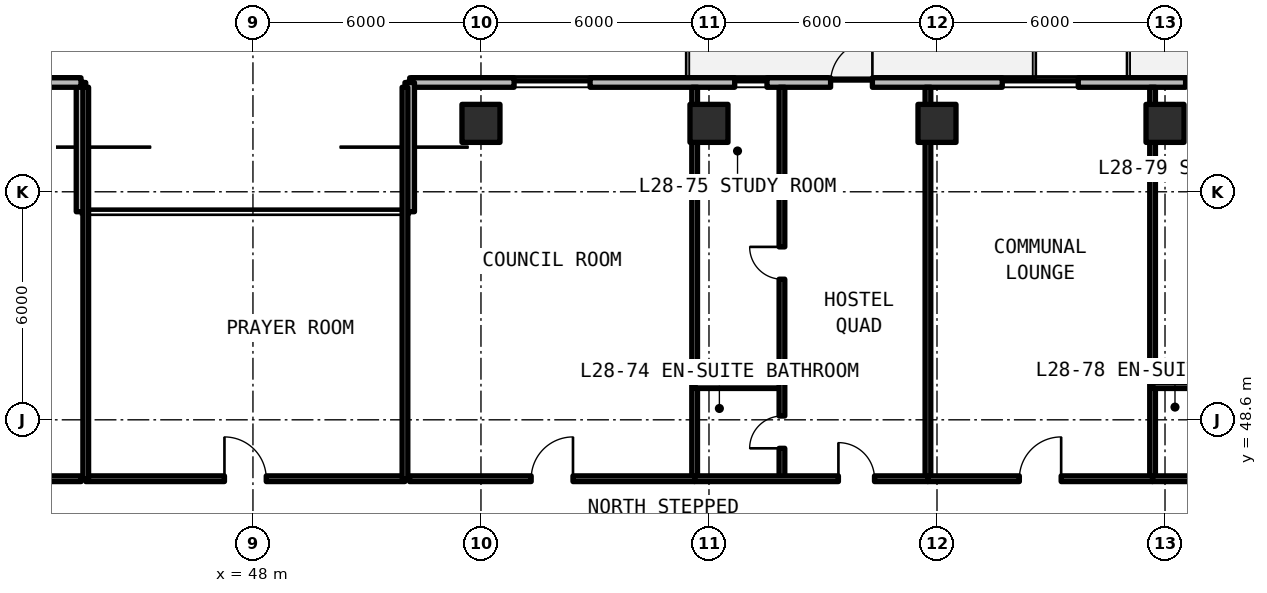
"""IFC4 building model, lengths in metres.
Left out: names, types, materials, properties, quantities, classifications, styles, units other than length and angle.
Written with IfcOpenShell. Run it as: python <this file> out.ifc"""

import sys

from ifc_helpers import new_model, si_unit, direction, frame, frame_2d, origin, origin_2d, place, context, subcontext, project, spatial, rectangle, extrude, element, fill, save


model = new_model("IFC4")
c1 = context("Model", 3, precision=1e-05, world=origin(), true_north=direction((0.0, 1.0)))
c2 = subcontext(c1, "Body", "Model", "MODEL_VIEW")
j1 = project(units=[si_unit("LENGTHUNIT", "METRE"), si_unit("PLANEANGLEUNIT", "RADIAN")], contexts=[c1])
p1 = place(None, origin())
s1 = spatial("IfcSite", under=j1, at=p1, CompositionType="ELEMENT")
p2 = place(p1, origin())
s2 = spatial("IfcBuilding", under=s1, at=p2, CompositionType="ELEMENT")
p3 = place(p2, frame((0.0, 0.0, 101.97)))
s3 = spatial("IfcBuildingStorey", under=s2, at=p3, CompositionType="ELEMENT", Elevation=101.97)
for number, where, z_axis, x_axis in (
    (1, (54.0, 56.4, 0.0), (0.0, 0.0, 1.0), (1.0, 0.0, 0.0)),
    (2, (60.0, 56.4, 0.0), (0.0, 0.0, 1.0), (1.0, 0.0, 0.0)),
    (3, (66.0, 56.4, 0.0), (0.0, 0.0, 1.0), (1.0, 0.0, 0.0)),
    (4, (72.0, 56.4, 0.0), (0.0, 0.0, 1.0), (1.0, 0.0, 0.0)),
):
    element("IfcColumn", number, at=place(p3, frame(where, z_axis=z_axis, x_axis=x_axis)), inside=s3, PredefinedType="COLUMN", context=c2, shape_type="SweptSolid", body=[
        extrude(rectangle(XDim=1.0, YDim=1.0, at=origin_2d()), origin(), (0.0, 0.0, 1.0), 3.3),
    ])
p4 = place(p3, frame((96.148, 57.475, 0.0), z_axis=(0.0, 0.0, 1.0), x_axis=(-1.0, 0.0, 0.0)))
e5 = element("IfcWall", 5, at=p4, inside=s3, PredefinedType="SOLIDWALL", context=c2, shape_type="SweptSolid", body=[
    extrude(rectangle(XDim=44.023, YDim=0.25, at=frame_2d((22.012, 0.0))), origin(), (0.0, 0.0, 1.0), 3.08),
])
p5 = place(p4, frame((31.848, 0.0, 0.0)))
e6 = element("IfcOpeningElement", 6, at=p5, cuts=e5, PredefinedType="OPENING", context=c2, shape_type="SweptSolid", body=[
    extrude(rectangle(XDim=1.1, YDim=2.15, at=frame_2d((0.55, 1.075))), frame((0.0, 0.135, 0.0), z_axis=(0.0, -1.0, 0.0), x_axis=(1.0, 0.0, 0.0)), (0.0, 0.0, 1.0), 0.27),
])
p6 = place(p4, frame((19.998, 0.0, 0.0)))
e7 = element("IfcOpeningElement", 7, at=p6, cuts=e5, PredefinedType="OPENING", context=c2, shape_type="SweptSolid", body=[
    extrude(rectangle(XDim=1.1, YDim=2.15, at=frame_2d((0.55, 1.075))), frame((0.0, 0.135, 0.0), z_axis=(0.0, -1.0, 0.0), x_axis=(1.0, 0.0, 0.0)), (0.0, 0.0, 1.0), 0.27),
])
p7 = place(p4, frame((8.398, 0.0, 0.0)))
e8 = element("IfcOpeningElement", 8, at=p7, cuts=e5, PredefinedType="OPENING", context=c2, shape_type="SweptSolid", body=[
    extrude(rectangle(XDim=1.1, YDim=2.15, at=frame_2d((0.55, 1.075))), frame((0.0, 0.135, 0.0), z_axis=(0.0, -1.0, 0.0), x_axis=(1.0, 0.0, 0.0)), (0.0, 0.0, 1.0), 0.27),
])
p8 = place(p4, frame((39.277, 0.0, 0.78)))
e9 = element("IfcOpeningElement", 9, at=p8, cuts=e5, PredefinedType="OPENING", context=c2, shape_type="SweptSolid", body=[
    extrude(rectangle(XDim=2.0, YDim=1.66, at=frame_2d((1.0, 0.83))), frame((0.0, 0.135, 0.0), z_axis=(0.0, -1.0, 0.0), x_axis=(1.0, 0.0, 0.0)), (0.0, 0.0, 1.0), 0.27),
])
p9 = place(p4, frame((34.622, 0.0, 0.78)))
e10 = element("IfcOpeningElement", 10, at=p9, cuts=e5, PredefinedType="OPENING", context=c2, shape_type="SweptSolid", body=[
    extrude(rectangle(XDim=0.85, YDim=1.65, at=frame_2d((0.425, 0.825))), frame((0.0, 0.135, 0.0), z_axis=(0.0, -1.0, 0.0), x_axis=(1.0, 0.0, 0.0)), (0.0, 0.0, 1.0), 0.27),
])
p10 = place(p4, frame((26.431, 0.0, 0.78)))
e11 = element("IfcOpeningElement", 11, at=p10, cuts=e5, PredefinedType="OPENING", context=c2, shape_type="SweptSolid", body=[
    extrude(rectangle(XDim=2.0, YDim=1.66, at=frame_2d((1.0, 0.83))), frame((0.0, 0.135, 0.0), z_axis=(0.0, -1.0, 0.0), x_axis=(1.0, 0.0, 0.0)), (0.0, 0.0, 1.0), 0.27),
])
p11 = place(p4, frame((22.757, 0.0, 0.78)))
e12 = element("IfcOpeningElement", 12, at=p11, cuts=e5, PredefinedType="OPENING", context=c2, shape_type="SweptSolid", body=[
    extrude(rectangle(XDim=0.85, YDim=1.65, at=frame_2d((0.425, 0.825))), frame((0.0, 0.135, 0.0), z_axis=(0.0, -1.0, 0.0), x_axis=(1.0, 0.0, 0.0)), (0.0, 0.0, 1.0), 0.27),
])
p12 = place(p4, frame((16.669, 0.0, 0.78)))
e13 = element("IfcOpeningElement", 13, at=p12, cuts=e5, PredefinedType="OPENING", context=c2, shape_type="SweptSolid", body=[
    extrude(rectangle(XDim=0.85, YDim=1.65, at=frame_2d((0.425, 0.825))), frame((0.0, 0.135, 0.0), z_axis=(0.0, -1.0, 0.0), x_axis=(1.0, 0.0, 0.0)), (0.0, 0.0, 1.0), 0.27),
])
p13 = place(p4, frame((13.159, 0.0, 0.78)))
e14 = element("IfcOpeningElement", 14, at=p13, cuts=e5, PredefinedType="OPENING", context=c2, shape_type="SweptSolid", body=[
    extrude(rectangle(XDim=2.0, YDim=1.66, at=frame_2d((1.0, 0.83))), frame((0.0, 0.135, 0.0), z_axis=(0.0, -1.0, 0.0), x_axis=(1.0, 0.0, 0.0)), (0.0, 0.0, 1.0), 0.27),
])
p14 = place(p4, frame((10.56, 0.0, 0.78)))
e15 = element("IfcOpeningElement", 15, at=p14, cuts=e5, PredefinedType="OPENING", context=c2, shape_type="SweptSolid", body=[
    extrude(rectangle(XDim=0.85, YDim=1.65, at=frame_2d((0.425, 0.825))), frame((0.0, 0.135, 0.0), z_axis=(0.0, -1.0, 0.0), x_axis=(1.0, 0.0, 0.0)), (0.0, 0.0, 1.0), 0.27),
])
p15 = place(p4, frame((4.619, 0.0, 0.78)))
e16 = element("IfcOpeningElement", 16, at=p15, cuts=e5, PredefinedType="OPENING", context=c2, shape_type="SweptSolid", body=[
    extrude(rectangle(XDim=0.85, YDim=1.65, at=frame_2d((0.425, 0.825))), frame((0.0, 0.135, 0.0), z_axis=(0.0, -1.0, 0.0), x_axis=(1.0, 0.0, 0.0)), (0.0, 0.0, 1.0), 0.27),
])
p16 = place(p4, frame((1.109, 0.0, 0.78)))
e17 = element("IfcOpeningElement", 17, at=p16, cuts=e5, PredefinedType="OPENING", context=c2, shape_type="SweptSolid", body=[
    extrude(rectangle(XDim=2.0, YDim=1.66, at=frame_2d((1.0, 0.83))), frame((0.0, 0.135, 0.0), z_axis=(0.0, -1.0, 0.0), x_axis=(1.0, 0.0, 0.0)), (0.0, 0.0, 1.0), 0.27),
])
for number, where, z_axis, x_axis in (
    (18, (52.125, 57.475, 0.0), (0.0, 0.0, 1.0), (0.0, -1.0, 0.0)),
    (19, (43.475, 54.075, 0.0), (0.0, 0.0, 1.0), (0.0, 1.0, 0.0)),
):
    element("IfcWall", number, at=place(p3, frame(where, z_axis=z_axis, x_axis=x_axis)), inside=s3, PredefinedType="SOLIDWALL", context=c2, shape_type="SweptSolid", body=[
        extrude(rectangle(XDim=3.4, YDim=0.25, at=frame_2d((1.7, 0.0))), origin(), (0.0, 0.0, 1.0), 3.08),
    ])
p17 = place(p3, frame((43.475, 57.475, 0.0), z_axis=(0.0, 0.0, 1.0), x_axis=(-1.0, 0.0, 0.0)))
e20 = element("IfcWall", 20, at=p17, inside=s3, PredefinedType="SOLIDWALL", context=c2, shape_type="SweptSolid", body=[
    extrude(rectangle(XDim=22.023, YDim=0.25, at=frame_2d((11.012, 0.0))), origin(), (0.0, 0.0, 1.0), 3.08),
])
p18 = place(p17, frame((14.925, 0.0, 0.0)))
e21 = element("IfcOpeningElement", 21, at=p18, cuts=e20, PredefinedType="OPENING", context=c2, shape_type="SweptSolid", body=[
    extrude(rectangle(XDim=1.1, YDim=2.15, at=frame_2d((0.55, 1.075))), frame((0.0, 0.135, 0.0), z_axis=(0.0, -1.0, 0.0), x_axis=(1.0, 0.0, 0.0)), (0.0, 0.0, 1.0), 0.27),
])
p19 = place(p17, frame((17.31, 0.0, 0.78)))
e22 = element("IfcOpeningElement", 22, at=p19, cuts=e20, PredefinedType="OPENING", context=c2, shape_type="SweptSolid", body=[
    extrude(rectangle(XDim=1.4, YDim=1.65, at=frame_2d((0.7, 0.825))), frame((0.0, 0.135, 0.0), z_axis=(0.0, -1.0, 0.0), x_axis=(1.0, 0.0, 0.0)), (0.0, 0.0, 1.0), 0.27),
])
p20 = place(p17, frame((10.125, 0.0, 0.78)))
e23 = element("IfcOpeningElement", 23, at=p20, cuts=e20, PredefinedType="OPENING", context=c2, shape_type="SweptSolid", body=[
    extrude(rectangle(XDim=0.85, YDim=1.65, at=frame_2d((0.425, 0.825))), frame((0.0, 0.135, 0.0), z_axis=(0.0, -1.0, 0.0), x_axis=(1.0, 0.0, 0.0)), (0.0, 0.0, 1.0), 0.27),
])
p21 = place(p17, frame((5.714, 0.0, 0.78)))
e24 = element("IfcOpeningElement", 24, at=p21, cuts=e20, PredefinedType="OPENING", context=c2, shape_type="SweptSolid", body=[
    extrude(rectangle(XDim=0.85, YDim=1.65, at=frame_2d((0.425, 0.825))), frame((0.0, 0.135, 0.0), z_axis=(0.0, -1.0, 0.0), x_axis=(1.0, 0.0, 0.0)), (0.0, 0.0, 1.0), 0.27),
])
p22 = place(p17, frame((2.08, 0.0, 0.78)))
e25 = element("IfcOpeningElement", 25, at=p22, cuts=e20, PredefinedType="OPENING", context=c2, shape_type="SweptSolid", body=[
    extrude(rectangle(XDim=0.85, YDim=1.65, at=frame_2d((0.425, 0.825))), frame((0.0, 0.135, 0.0), z_axis=(0.0, -1.0, 0.0), x_axis=(1.0, 0.0, 0.0)), (0.0, 0.0, 1.0), 0.27),
])
p23 = place(p3, frame((43.6, 47.05, 0.0), z_axis=(0.0, 0.0, 1.0), x_axis=(1.0, 0.0, 0.0)))
e26 = element("IfcWall", 26, at=p23, inside=s3, PredefinedType="SOLIDWALL", context=c2, shape_type="SweptSolid", body=[
    extrude(rectangle(XDim=8.4, YDim=0.15, at=frame_2d((4.2, 0.0))), origin(), (0.0, 0.0, 1.0), 2.35),
])
p24 = place(p23, frame((3.65, 0.0, 0.0)))
e27 = element("IfcOpeningElement", 27, at=p24, cuts=e26, PredefinedType="OPENING", context=c2, shape_type="SweptSolid", body=[
    extrude(rectangle(XDim=1.1, YDim=2.15, at=frame_2d((0.55, 1.075))), frame((0.0, 0.085, 0.0), z_axis=(0.0, -1.0, 0.0), x_axis=(1.0, 0.0, 0.0)), (0.0, 0.0, 1.0), 0.17),
])
for number, where, z_axis, x_axis in (
    (28, (43.6, 47.05, 0.0), (0.0, 0.0, 1.0), (0.0, 1.0, 0.0)),
    (29, (52.0, 47.05, 0.0), (0.0, 0.0, 1.0), (0.0, 1.0, 0.0)),
):
    element("IfcWall", number, at=place(p3, frame(where, z_axis=z_axis, x_axis=x_axis)), inside=s3, PredefinedType="SOLIDWALL", context=c2, shape_type="SweptSolid", body=[
        extrude(rectangle(XDim=10.3, YDim=0.15, at=frame_2d((5.15, 0.0))), origin(), (0.0, 0.0, 1.0), 2.35),
    ])
p25 = place(p3, frame((38.692, 47.05, 0.0), z_axis=(0.0, 0.0, 1.0), x_axis=(1.0, 0.0, 0.0)))
e30 = element("IfcWall", 30, at=p25, inside=s3, PredefinedType="SOLIDWALL", context=c2, shape_type="SweptSolid", body=[
    extrude(rectangle(XDim=4.788, YDim=0.15, at=frame_2d((2.394, 0.0))), origin(), (0.0, 0.0, 1.0), 2.35),
])
p26 = place(p25, frame((2.653, 0.0, 0.0)))
e31 = element("IfcOpeningElement", 31, at=p26, cuts=e30, PredefinedType="OPENING", context=c2, shape_type="SweptSolid", body=[
    extrude(rectangle(XDim=0.95, YDim=2.15, at=frame_2d((0.475, 1.075))), frame((0.0, 0.085, 0.0), z_axis=(0.0, -1.0, 0.0), x_axis=(1.0, 0.0, 0.0)), (0.0, 0.0, 1.0), 0.17),
])
p27 = place(p3, frame((59.623, 47.05, 0.0), z_axis=(0.0, 0.0, 1.0), x_axis=(0.0, 1.0, 0.0)))
e32 = element("IfcWall", 32, at=p27, inside=s3, PredefinedType="SOLIDWALL", context=c2, shape_type="SweptSolid", body=[
    extrude(rectangle(XDim=10.3, YDim=0.15, at=frame_2d((5.15, 0.0))), origin(), (0.0, 0.0, 1.0), 2.35),
])
p28 = place(p3, frame((52.12, 47.05, 0.0), z_axis=(0.0, 0.0, 1.0), x_axis=(1.0, 0.0, 0.0)))
e33 = element("IfcWall", 33, at=p28, inside=s3, PredefinedType="SOLIDWALL", context=c2, shape_type="SweptSolid", body=[
    extrude(rectangle(XDim=7.503, YDim=0.15, at=frame_2d((3.751, 0.0))), origin(), (0.0, 0.0, 1.0), 2.35),
])
p29 = place(p28, frame((3.201, 0.0, 0.0)))
e34 = element("IfcOpeningElement", 34, at=p29, cuts=e33, PredefinedType="OPENING", context=c2, shape_type="SweptSolid", body=[
    extrude(rectangle(XDim=1.1, YDim=2.15, at=frame_2d((0.55, 1.075))), frame((0.0, 0.085, 0.0), z_axis=(0.0, -1.0, 0.0), x_axis=(1.0, 0.0, 0.0)), (0.0, 0.0, 1.0), 0.17),
])
p30 = place(p3, frame((65.761, 47.05, 0.0), z_axis=(0.0, 0.0, 1.0), x_axis=(0.0, 1.0, 0.0)))
e35 = element("IfcWall", 35, at=p30, inside=s3, PredefinedType="SOLIDWALL", context=c2, shape_type="SweptSolid", body=[
    extrude(rectangle(XDim=10.3, YDim=0.15, at=frame_2d((5.15, 0.0))), origin(), (0.0, 0.0, 1.0), 2.35),
])
p31 = place(p3, frame((59.623, 49.5, 0.0), z_axis=(0.0, 0.0, 1.0), x_axis=(1.0, 0.0, 0.0)))
e36 = element("IfcWall", 36, at=p31, inside=s3, PredefinedType="PARTITIONING", context=c2, shape_type="SweptSolid", body=[
    extrude(rectangle(XDim=2.297, YDim=0.15, at=frame_2d((1.148, 0.0))), origin(), (0.0, 0.0, 1.0), 2.35),
])
p32 = place(p3, frame((61.92, 47.05, 0.0), z_axis=(0.0, 0.0, 1.0), x_axis=(0.0, 1.0, 0.0)))
e37 = element("IfcWall", 37, at=p32, inside=s3, PredefinedType="PARTITIONING", context=c2, shape_type="SweptSolid", body=[
    extrude(rectangle(XDim=10.3, YDim=0.15, at=frame_2d((5.15, 0.0))), origin(), (0.0, 0.0, 1.0), 2.35),
])
p33 = place(p32, frame((0.8, 0.0, 0.0)))
e38 = element("IfcOpeningElement", 38, at=p33, cuts=e37, PredefinedType="OPENING", context=c2, shape_type="SweptSolid", body=[
    extrude(rectangle(XDim=0.85, YDim=2.1, at=frame_2d((0.425, 1.05))), frame((0.0, 0.085, 0.0), z_axis=(0.0, -1.0, 0.0), x_axis=(1.0, 0.0, 0.0)), (0.0, 0.0, 1.0), 0.17),
])
p34 = place(p32, frame((5.25, 0.0, 0.0)))
e39 = element("IfcOpeningElement", 39, at=p34, cuts=e37, PredefinedType="OPENING", context=c2, shape_type="SweptSolid", body=[
    extrude(rectangle(XDim=0.85, YDim=2.1, at=frame_2d((0.425, 1.05))), frame((0.0, 0.085, 0.0), z_axis=(0.0, -1.0, 0.0), x_axis=(1.0, 0.0, 0.0)), (0.0, 0.0, 1.0), 0.17),
])
p35 = place(p3, frame((59.623, 47.05, 0.0), z_axis=(0.0, 0.0, 1.0), x_axis=(1.0, 0.0, 0.0)))
e40 = element("IfcWall", 40, at=p35, inside=s3, PredefinedType="SOLIDWALL", context=c2, shape_type="SweptSolid", body=[
    extrude(rectangle(XDim=6.139, YDim=0.15, at=frame_2d((3.069, 0.0))), origin(), (0.0, 0.0, 1.0), 2.35),
])
p36 = place(p35, frame((3.783, 0.0, 0.0)))
e41 = element("IfcOpeningElement", 41, at=p36, cuts=e40, PredefinedType="OPENING", context=c2, shape_type="SweptSolid", body=[
    extrude(rectangle(XDim=0.95, YDim=2.15, at=frame_2d((0.475, 1.075))), frame((0.0, 0.085, 0.0), z_axis=(0.0, -1.0, 0.0), x_axis=(1.0, 0.0, 0.0)), (0.0, 0.0, 1.0), 0.17),
])
p37 = place(p3, frame((71.673, 47.05, 0.0), z_axis=(0.0, 0.0, 1.0), x_axis=(0.0, 1.0, 0.0)))
e42 = element("IfcWall", 42, at=p37, inside=s3, PredefinedType="SOLIDWALL", context=c2, shape_type="SweptSolid", body=[
    extrude(rectangle(XDim=10.3, YDim=0.15, at=frame_2d((5.15, 0.0))), origin(), (0.0, 0.0, 1.0), 2.35),
])
p38 = place(p3, frame((65.761, 47.05, 0.0), z_axis=(0.0, 0.0, 1.0), x_axis=(1.0, 0.0, 0.0)))
e43 = element("IfcWall", 43, at=p38, inside=s3, PredefinedType="SOLIDWALL", context=c2, shape_type="SweptSolid", body=[
    extrude(rectangle(XDim=5.911, YDim=0.15, at=frame_2d((2.956, 0.0))), origin(), (0.0, 0.0, 1.0), 2.35),
])
p39 = place(p38, frame((2.406, 0.0, 0.0)))
e44 = element("IfcOpeningElement", 44, at=p39, cuts=e43, PredefinedType="OPENING", context=c2, shape_type="SweptSolid", body=[
    extrude(rectangle(XDim=1.1, YDim=2.15, at=frame_2d((0.55, 1.075))), frame((0.0, 0.085, 0.0), z_axis=(0.0, -1.0, 0.0), x_axis=(1.0, 0.0, 0.0)), (0.0, 0.0, 1.0), 0.17),
])
p40 = place(p3, frame((71.673, 49.5, 0.0), z_axis=(0.0, 0.0, 1.0), x_axis=(1.0, 0.0, 0.0)))
e45 = element("IfcWall", 45, at=p40, inside=s3, PredefinedType="PARTITIONING", context=c2, shape_type="SweptSolid", body=[
    extrude(rectangle(XDim=2.247, YDim=0.15, at=frame_2d((1.124, 0.0))), origin(), (0.0, 0.0, 1.0), 2.35),
])
p41 = place(p3, frame((71.673, 47.05, 0.0), z_axis=(0.0, 0.0, 1.0), x_axis=(1.0, 0.0, 0.0)))
e46 = element("IfcWall", 46, at=p41, inside=s3, PredefinedType="SOLIDWALL", context=c2, shape_type="SweptSolid", body=[
    extrude(rectangle(XDim=6.366, YDim=0.15, at=frame_2d((3.183, 0.0))), origin(), (0.0, 0.0, 1.0), 2.35),
])
p42 = place(p41, frame((3.872, 0.0, 0.0)))
e47 = element("IfcOpeningElement", 47, at=p42, cuts=e46, PredefinedType="OPENING", context=c2, shape_type="SweptSolid", body=[
    extrude(rectangle(XDim=0.95, YDim=2.15, at=frame_2d((0.475, 1.075))), frame((0.0, 0.085, 0.0), z_axis=(0.0, -1.0, 0.0), x_axis=(1.0, 0.0, 0.0)), (0.0, 0.0, 1.0), 0.17),
])
p43 = place(p5, frame((1.1, 0.0, 0.0), z_axis=(0.0, 0.0, 1.0), x_axis=(-1.0, 0.0, 0.0)))
e48 = element("IfcDoor", 48, at=p43, inside=s3, OperationType="SINGLE_SWING_RIGHT", PredefinedType="DOOR", context=c2, shape_type="SweptSolid", body=[
    extrude(rectangle(XDim=1.1, YDim=2.15, at=frame_2d((0.55, 1.075))), frame((0.0, 0.025, 0.0), z_axis=(0.0, -1.0, 0.0), x_axis=(1.0, 0.0, 0.0)), (0.0, 0.0, 1.0), 0.05),
])
fill(e6, e48)
p44 = place(p8, origin())
e49 = element("IfcWindow", 49, at=p44, inside=s3, PartitioningType="SINGLE_PANEL", PredefinedType="WINDOW", context=c2, shape_type="SweptSolid", body=[
    extrude(rectangle(XDim=2.0, YDim=1.66, at=frame_2d((1.0, 0.83))), frame((0.0, 0.03, 0.0), z_axis=(0.0, -1.0, 0.0), x_axis=(1.0, 0.0, 0.0)), (0.0, 0.0, 1.0), 0.06),
])
fill(e9, e49)
p45 = place(p9, origin())
e50 = element("IfcWindow", 50, at=p45, inside=s3, PartitioningType="SINGLE_PANEL", PredefinedType="WINDOW", context=c2, shape_type="SweptSolid", body=[
    extrude(rectangle(XDim=0.85, YDim=1.65, at=frame_2d((0.425, 0.825))), frame((0.0, 0.03, 0.0), z_axis=(0.0, -1.0, 0.0), x_axis=(1.0, 0.0, 0.0)), (0.0, 0.0, 1.0), 0.06),
])
fill(e10, e50)
p46 = place(p10, origin())
e51 = element("IfcWindow", 51, at=p46, inside=s3, PartitioningType="SINGLE_PANEL", PredefinedType="WINDOW", context=c2, shape_type="SweptSolid", body=[
    extrude(rectangle(XDim=2.0, YDim=1.66, at=frame_2d((1.0, 0.83))), frame((0.0, 0.03, 0.0), z_axis=(0.0, -1.0, 0.0), x_axis=(1.0, 0.0, 0.0)), (0.0, 0.0, 1.0), 0.06),
])
fill(e11, e51)
p47 = place(p11, origin())
e52 = element("IfcWindow", 52, at=p47, inside=s3, PartitioningType="SINGLE_PANEL", PredefinedType="WINDOW", context=c2, shape_type="SweptSolid", body=[
    extrude(rectangle(XDim=0.85, YDim=1.65, at=frame_2d((0.425, 0.825))), frame((0.0, 0.03, 0.0), z_axis=(0.0, -1.0, 0.0), x_axis=(1.0, 0.0, 0.0)), (0.0, 0.0, 1.0), 0.06),
])
fill(e12, e52)
p48 = place(p24, origin())
e53 = element("IfcDoor", 53, at=p48, inside=s3, OperationType="SINGLE_SWING_LEFT", PredefinedType="DOOR", context=c2, shape_type="SweptSolid", body=[
    extrude(rectangle(XDim=1.1, YDim=2.15, at=frame_2d((0.55, 1.075))), frame((0.0, 0.025, 0.0), z_axis=(0.0, -1.0, 0.0), x_axis=(1.0, 0.0, 0.0)), (0.0, 0.0, 1.0), 0.05),
])
fill(e27, e53)
p49 = place(p29, origin())
e54 = element("IfcDoor", 54, at=p49, inside=s3, OperationType="SINGLE_SWING_RIGHT", PredefinedType="DOOR", context=c2, shape_type="SweptSolid", body=[
    extrude(rectangle(XDim=1.1, YDim=2.15, at=frame_2d((0.55, 1.075))), frame((0.0, 0.025, 0.0), z_axis=(0.0, -1.0, 0.0), x_axis=(1.0, 0.0, 0.0)), (0.0, 0.0, 1.0), 0.05),
])
fill(e34, e54)
p50 = place(p33, origin())
e55 = element("IfcDoor", 55, at=p50, inside=s3, OperationType="SINGLE_SWING_LEFT", PredefinedType="DOOR", context=c2, shape_type="SweptSolid", body=[
    extrude(rectangle(XDim=0.85, YDim=2.1, at=frame_2d((0.425, 1.05))), frame((0.0, 0.025, 0.0), z_axis=(0.0, -1.0, 0.0), x_axis=(1.0, 0.0, 0.0)), (0.0, 0.0, 1.0), 0.05),
])
fill(e38, e55)
p51 = place(p34, origin())
e56 = element("IfcDoor", 56, at=p51, inside=s3, OperationType="SINGLE_SWING_RIGHT", PredefinedType="DOOR", context=c2, shape_type="SweptSolid", body=[
    extrude(rectangle(XDim=0.85, YDim=2.1, at=frame_2d((0.425, 1.05))), frame((0.0, 0.025, 0.0), z_axis=(0.0, -1.0, 0.0), x_axis=(1.0, 0.0, 0.0)), (0.0, 0.0, 1.0), 0.05),
])
fill(e39, e56)
p52 = place(p36, origin())
e57 = element("IfcDoor", 57, at=p52, inside=s3, OperationType="SINGLE_SWING_LEFT", PredefinedType="DOOR", context=c2, shape_type="SweptSolid", body=[
    extrude(rectangle(XDim=0.95, YDim=2.15, at=frame_2d((0.475, 1.075))), frame((0.0, 0.025, 0.0), z_axis=(0.0, -1.0, 0.0), x_axis=(1.0, 0.0, 0.0)), (0.0, 0.0, 1.0), 0.05),
])
fill(e41, e57)
p53 = place(p39, origin())
e58 = element("IfcDoor", 58, at=p53, inside=s3, OperationType="SINGLE_SWING_RIGHT", PredefinedType="DOOR", context=c2, shape_type="SweptSolid", body=[
    extrude(rectangle(XDim=1.1, YDim=2.15, at=frame_2d((0.55, 1.075))), frame((0.0, 0.025, 0.0), z_axis=(0.0, -1.0, 0.0), x_axis=(1.0, 0.0, 0.0)), (0.0, 0.0, 1.0), 0.05),
])
fill(e44, e58)
save(model, sys.argv[1])
